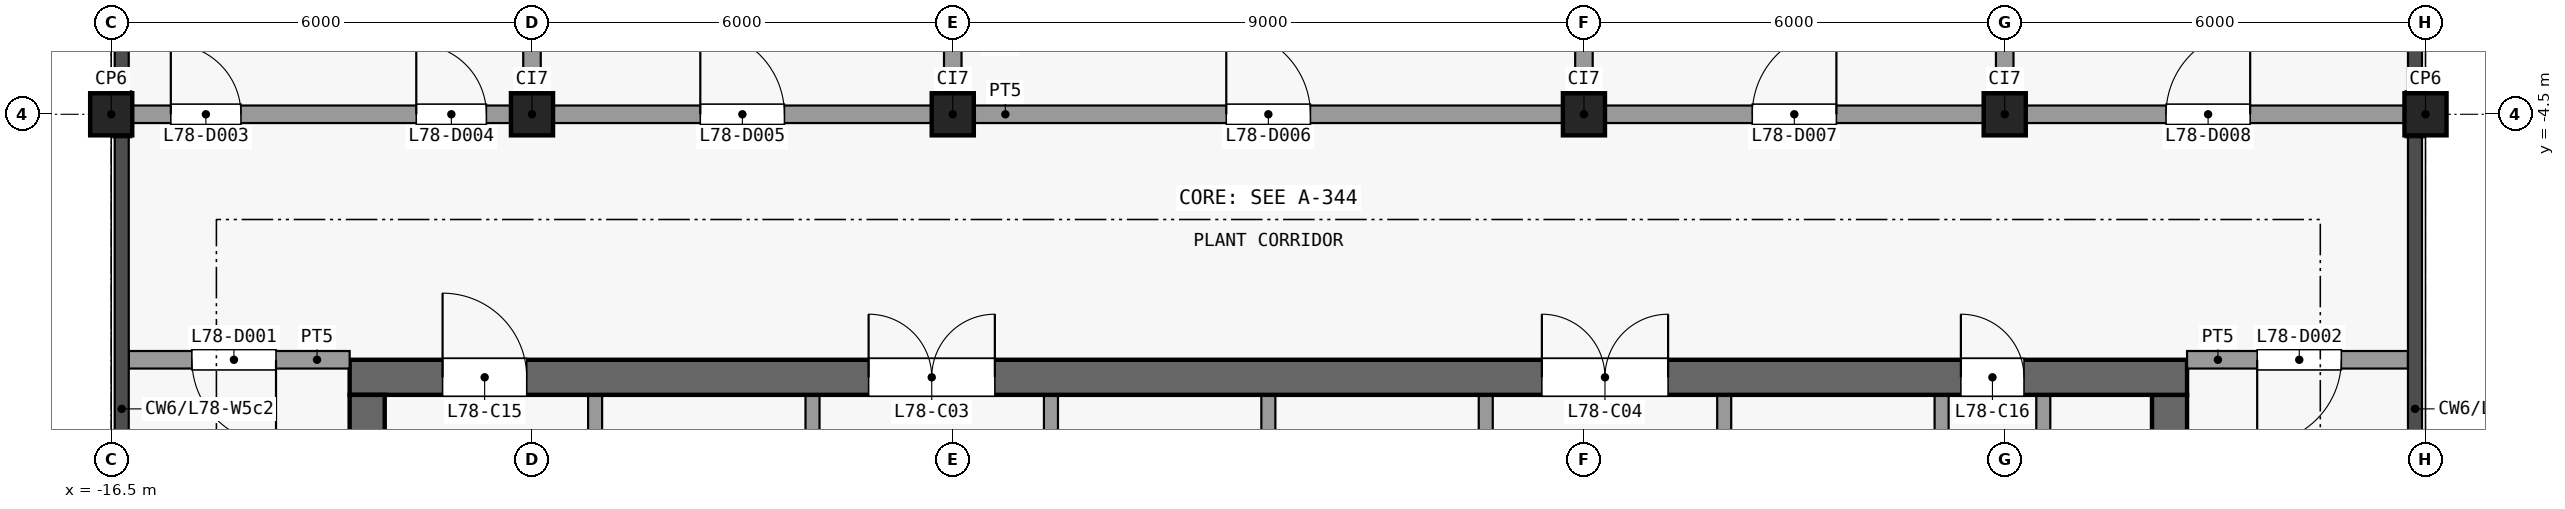
"""IFC4 building model, lengths in metres.
Left out: names, types, materials, properties, quantities, classifications, styles, units other than length and angle.
Written with IfcOpenShell. Run it as: python <this file> out.ifc"""

import sys

from ifc_helpers import new_model, si_unit, direction, frame, frame_2d, origin, origin_2d, place, context, subcontext, project, spatial, rectangle, extrude, element, fill, save


model = new_model("IFC4")
c1 = context("Model", 3, precision=1e-05, world=origin(), true_north=direction((0.0, 1.0)))
c2 = subcontext(c1, "Body", "Model", "MODEL_VIEW")
j1 = project(units=[si_unit("LENGTHUNIT", "METRE"), si_unit("PLANEANGLEUNIT", "RADIAN")], contexts=[c1])
p1 = place(None, origin())
s1 = spatial("IfcSite", under=j1, at=p1, CompositionType="ELEMENT")
p2 = place(p1, origin())
s2 = spatial("IfcBuilding", under=s1, at=p2, CompositionType="ELEMENT")
p3 = place(p2, frame((0.0, 0.0, 307.7)))
s3 = spatial("IfcBuildingStorey", under=s2, at=p3, CompositionType="ELEMENT", Elevation=307.7)
for number, where, z_axis, x_axis in (
    (1, (-16.5, -4.5, 0.0), (0.0, 0.0, 1.0), (1.0, 0.0, 0.0)),
    (2, (-10.5, -4.5, 0.0), (0.0, 0.0, 1.0), (1.0, 0.0, 0.0)),
    (3, (-4.5, -4.5, 0.0), (0.0, 0.0, 1.0), (1.0, 0.0, 0.0)),
    (4, (4.5, -4.5, 0.0), (0.0, 0.0, 1.0), (1.0, 0.0, 0.0)),
    (5, (10.5, -4.5, 0.0), (0.0, 0.0, 1.0), (1.0, 0.0, 0.0)),
    (6, (16.5, -4.5, 0.0), (0.0, 0.0, 1.0), (1.0, 0.0, 0.0)),
):
    element("IfcColumn", number, at=place(p3, frame(where, z_axis=z_axis, x_axis=x_axis)), inside=s3, PredefinedType="COLUMN", context=c2, shape_type="SweptSolid", body=[
        extrude(rectangle(XDim=0.6, YDim=0.6, at=origin_2d()), origin(), (0.0, 0.0, 1.0), 4.5),
    ])
p4 = place(p3, frame((-13.1, -8.25, 0.0), z_axis=(0.0, 0.0, 1.0), x_axis=(1.0, 0.0, 0.0)))
e7 = element("IfcWall", 7, at=p4, inside=s3, PredefinedType="SHEAR", context=c2, shape_type="SweptSolid", body=[
    extrude(rectangle(XDim=26.2, YDim=0.5, at=frame_2d((13.1, 0.0))), origin(), (0.0, 0.0, 1.0), 4.1),
])
p5 = place(p4, frame((7.4, 0.0, 0.0)))
e8 = element("IfcOpeningElement", 8, at=p5, cuts=e7, PredefinedType="OPENING", context=c2, shape_type="SweptSolid", body=[
    extrude(rectangle(XDim=1.8, YDim=2.1, at=frame_2d((0.9, 1.05))), frame((0.0, 0.26, 0.0), z_axis=(0.0, -1.0, 0.0), x_axis=(1.0, 0.0, 0.0)), (0.0, 0.0, 1.0), 0.52),
])
p6 = place(p4, frame((17.0, 0.0, 0.0)))
e9 = element("IfcOpeningElement", 9, at=p6, cuts=e7, PredefinedType="OPENING", context=c2, shape_type="SweptSolid", body=[
    extrude(rectangle(XDim=1.8, YDim=2.1, at=frame_2d((0.9, 1.05))), frame((0.0, 0.26, 0.0), z_axis=(0.0, -1.0, 0.0), x_axis=(1.0, 0.0, 0.0)), (0.0, 0.0, 1.0), 0.52),
])
p7 = place(p4, frame((1.325, 0.0, 0.0)))
e10 = element("IfcOpeningElement", 10, at=p7, cuts=e7, PredefinedType="OPENING", context=c2, shape_type="SweptSolid", body=[
    extrude(rectangle(XDim=1.2, YDim=2.1, at=frame_2d((0.6, 1.05))), frame((0.0, 0.26, 0.0), z_axis=(0.0, -1.0, 0.0), x_axis=(1.0, 0.0, 0.0)), (0.0, 0.0, 1.0), 0.52),
])
p8 = place(p4, frame((22.975, 0.0, 0.0)))
e11 = element("IfcOpeningElement", 11, at=p8, cuts=e7, PredefinedType="OPENING", context=c2, shape_type="SweptSolid", body=[
    extrude(rectangle(XDim=0.9, YDim=2.1, at=frame_2d((0.45, 1.05))), frame((0.0, 0.26, 0.0), z_axis=(0.0, -1.0, 0.0), x_axis=(1.0, 0.0, 0.0)), (0.0, 0.0, 1.0), 0.52),
])
for number, where, z_axis, x_axis in (
    (12, (-12.85, -24.6, 0.0), (0.0, 0.0, 1.0), (0.0, 1.0, 0.0)),
    (13, (12.85, -24.6, 0.0), (0.0, 0.0, 1.0), (0.0, 1.0, 0.0)),
):
    element("IfcWall", number, at=place(p3, frame(where, z_axis=z_axis, x_axis=x_axis)), inside=s3, PredefinedType="SHEAR", context=c2, shape_type="SweptSolid", body=[
        extrude(rectangle(XDim=16.1, YDim=0.5, at=frame_2d((8.05, 0.0))), origin(), (0.0, 0.0, 1.0), 4.1),
    ])
p9 = place(p3, frame((-9.6, -16.9, 0.0), z_axis=(0.0, 0.0, 1.0), x_axis=(0.0, 1.0, 0.0)))
e14 = element("IfcWall", 14, at=p9, inside=s3, PredefinedType="PARTITIONING", context=c2, shape_type="SweptSolid", body=[
    extrude(rectangle(XDim=8.4, YDim=0.2, at=frame_2d((4.2, 0.0))), origin(), (0.0, 0.0, 1.0), 4.1),
])
p10 = place(p3, frame((-6.5, -22.5, 0.0), z_axis=(0.0, 0.0, 1.0), x_axis=(0.0, 1.0, 0.0)))
e15 = element("IfcWall", 15, at=p10, inside=s3, PredefinedType="PARTITIONING", context=c2, shape_type="SweptSolid", body=[
    extrude(rectangle(XDim=14.0, YDim=0.2, at=frame_2d((7.0, 0.0))), origin(), (0.0, 0.0, 1.0), 4.1),
])
p11 = place(p10, frame((2.28, 0.0, 0.0)))
e16 = element("IfcOpeningElement", 16, at=p11, cuts=e15, PredefinedType="OPENING", context=c2, shape_type="SweptSolid", body=[
    extrude(rectangle(XDim=1.2, YDim=2.1, at=frame_2d((0.6, 1.05))), frame((0.0, 0.11, 0.0), z_axis=(0.0, -1.0, 0.0), x_axis=(1.0, 0.0, 0.0)), (0.0, 0.0, 1.0), 0.22),
])
p12 = place(p10, frame((9.23, 0.0, 0.0)))
e17 = element("IfcOpeningElement", 17, at=p12, cuts=e15, PredefinedType="OPENING", context=c2, shape_type="SweptSolid", body=[
    extrude(rectangle(XDim=1.2, YDim=2.1, at=frame_2d((0.6, 1.05))), frame((0.0, 0.11, 0.0), z_axis=(0.0, -1.0, 0.0), x_axis=(1.0, 0.0, 0.0)), (0.0, 0.0, 1.0), 0.22),
])
p13 = place(p3, frame((-3.1, -8.5, 0.0), z_axis=(0.0, 0.0, 1.0), x_axis=(0.0, -1.0, 0.0)))
e18 = element("IfcWall", 18, at=p13, inside=s3, PredefinedType="PARTITIONING", context=c2, shape_type="SweptSolid", body=[
    extrude(rectangle(XDim=10.97, YDim=0.2, at=frame_2d((5.485, 0.0))), origin(), (0.0, 0.0, 1.0), 4.1),
])
p14 = place(p13, frame((7.74, 0.0, 0.0)))
e19 = element("IfcOpeningElement", 19, at=p14, cuts=e18, PredefinedType="OPENING", context=c2, shape_type="SweptSolid", body=[
    extrude(rectangle(XDim=1.2, YDim=2.1, at=frame_2d((0.6, 1.05))), frame((0.0, 0.11, 0.0), z_axis=(0.0, -1.0, 0.0), x_axis=(1.0, 0.0, 0.0)), (0.0, 0.0, 1.0), 0.22),
])
p15 = place(p13, frame((2.18, 0.0, 0.0)))
e20 = element("IfcOpeningElement", 20, at=p15, cuts=e18, PredefinedType="OPENING", context=c2, shape_type="SweptSolid", body=[
    extrude(rectangle(XDim=1.2, YDim=2.1, at=frame_2d((0.6, 1.05))), frame((0.0, 0.11, 0.0), z_axis=(0.0, -1.0, 0.0), x_axis=(1.0, 0.0, 0.0)), (0.0, 0.0, 1.0), 0.22),
])
p16 = place(p3, frame((0.0, -19.35, 0.0), z_axis=(0.0, 0.0, 1.0), x_axis=(0.0, 1.0, 0.0)))
e21 = element("IfcWall", 21, at=p16, inside=s3, PredefinedType="PARTITIONING", context=c2, shape_type="SweptSolid", body=[
    extrude(rectangle(XDim=10.85, YDim=0.2, at=frame_2d((5.425, 0.0))), origin(), (0.0, 0.0, 1.0), 4.1),
])
p17 = place(p3, frame((3.1, -19.6, 0.0), z_axis=(0.0, 0.0, 1.0), x_axis=(0.0, 1.0, 0.0)))
e22 = element("IfcWall", 22, at=p17, inside=s3, PredefinedType="PARTITIONING", context=c2, shape_type="SweptSolid", body=[
    extrude(rectangle(XDim=11.1, YDim=0.2, at=frame_2d((5.55, 0.0))), origin(), (0.0, 0.0, 1.0), 4.1),
])
p18 = place(p17, frame((2.25, 0.0, 0.0)))
e23 = element("IfcOpeningElement", 23, at=p18, cuts=e22, PredefinedType="OPENING", context=c2, shape_type="SweptSolid", body=[
    extrude(rectangle(XDim=1.2, YDim=2.1, at=frame_2d((0.6, 1.05))), frame((0.0, 0.11, 0.0), z_axis=(0.0, -1.0, 0.0), x_axis=(1.0, 0.0, 0.0)), (0.0, 0.0, 1.0), 0.22),
])
p19 = place(p17, frame((7.75, 0.0, 0.0)))
e24 = element("IfcOpeningElement", 24, at=p19, cuts=e22, PredefinedType="OPENING", context=c2, shape_type="SweptSolid", body=[
    extrude(rectangle(XDim=1.2, YDim=2.1, at=frame_2d((0.6, 1.05))), frame((0.0, 0.11, 0.0), z_axis=(0.0, -1.0, 0.0), x_axis=(1.0, 0.0, 0.0)), (0.0, 0.0, 1.0), 0.22),
])
p20 = place(p3, frame((6.5, -8.5, 0.0), z_axis=(0.0, 0.0, 1.0), x_axis=(0.0, -1.0, 0.0)))
e25 = element("IfcWall", 25, at=p20, inside=s3, PredefinedType="PARTITIONING", context=c2, shape_type="SweptSolid", body=[
    extrude(rectangle(XDim=10.85, YDim=0.2, at=frame_2d((5.425, 0.0))), origin(), (0.0, 0.0, 1.0), 4.1),
])
p21 = place(p20, frame((6.275, 0.0, 0.0)))
e26 = element("IfcOpeningElement", 26, at=p21, cuts=e25, PredefinedType="OPENING", context=c2, shape_type="SweptSolid", body=[
    extrude(rectangle(XDim=1.2, YDim=2.1, at=frame_2d((0.6, 1.05))), frame((0.0, 0.11, 0.0), z_axis=(0.0, -1.0, 0.0), x_axis=(1.0, 0.0, 0.0)), (0.0, 0.0, 1.0), 0.22),
])
p22 = place(p20, frame((0.925, 0.0, 0.0)))
e27 = element("IfcOpeningElement", 27, at=p22, cuts=e25, PredefinedType="OPENING", context=c2, shape_type="SweptSolid", body=[
    extrude(rectangle(XDim=0.9, YDim=2.1, at=frame_2d((0.45, 1.05))), frame((0.0, 0.11, 0.0), z_axis=(0.0, -1.0, 0.0), x_axis=(1.0, 0.0, 0.0)), (0.0, 0.0, 1.0), 0.22),
])
p23 = place(p3, frame((9.6, -16.9, 0.0), z_axis=(0.0, 0.0, 1.0), x_axis=(0.0, 1.0, 0.0)))
e28 = element("IfcWall", 28, at=p23, inside=s3, PredefinedType="PARTITIONING", context=c2, shape_type="SweptSolid", body=[
    extrude(rectangle(XDim=8.4, YDim=0.2, at=frame_2d((4.2, 0.0))), origin(), (0.0, 0.0, 1.0), 4.1),
])
p24 = place(p3, frame((11.05, -8.5, 0.0), z_axis=(0.0, 0.0, 1.0), x_axis=(0.0, -1.0, 0.0)))
e29 = element("IfcWall", 29, at=p24, inside=s3, PredefinedType="PARTITIONING", context=c2, shape_type="SweptSolid", body=[
    extrude(rectangle(XDim=6.2, YDim=0.2, at=frame_2d((3.1, 0.0))), origin(), (0.0, 0.0, 1.0), 4.1),
])
p25 = place(p24, frame((2.6, 0.0, 0.0)))
e30 = element("IfcOpeningElement", 30, at=p25, cuts=e29, PredefinedType="OPENING", context=c2, shape_type="SweptSolid", body=[
    extrude(rectangle(XDim=0.9, YDim=2.1, at=frame_2d((0.45, 1.05))), frame((0.0, 0.11, 0.0), z_axis=(0.0, -1.0, 0.0), x_axis=(1.0, 0.0, 0.0)), (0.0, 0.0, 1.0), 0.22),
])
p26 = place(p3, frame((-16.25, -8.0, 0.0), z_axis=(0.0, 0.0, 1.0), x_axis=(1.0, 0.0, 0.0)))
e31 = element("IfcWall", 31, at=p26, inside=s3, PredefinedType="PARTITIONING", context=c2, shape_type="SweptSolid", body=[
    extrude(rectangle(XDim=3.15, YDim=0.25, at=frame_2d((1.575, 0.0))), origin(), (0.0, 0.0, 1.0), 4.1),
])
p27 = place(p26, frame((0.9, 0.0, 0.0)))
e32 = element("IfcOpeningElement", 32, at=p27, cuts=e31, PredefinedType="OPENING", context=c2, shape_type="SweptSolid", body=[
    extrude(rectangle(XDim=1.2, YDim=2.1, at=frame_2d((0.6, 1.05))), frame((0.0, 0.135, 0.0), z_axis=(0.0, -1.0, 0.0), x_axis=(1.0, 0.0, 0.0)), (0.0, 0.0, 1.0), 0.27),
])
p28 = place(p3, frame((13.1, -8.0, 0.0), z_axis=(0.0, 0.0, 1.0), x_axis=(1.0, 0.0, 0.0)))
e33 = element("IfcWall", 33, at=p28, inside=s3, PredefinedType="PARTITIONING", context=c2, shape_type="SweptSolid", body=[
    extrude(rectangle(XDim=3.15, YDim=0.25, at=frame_2d((1.575, 0.0))), origin(), (0.0, 0.0, 1.0), 4.1),
])
p29 = place(p28, frame((1.0, 0.0, 0.0)))
e34 = element("IfcOpeningElement", 34, at=p29, cuts=e33, PredefinedType="OPENING", context=c2, shape_type="SweptSolid", body=[
    extrude(rectangle(XDim=1.2, YDim=2.1, at=frame_2d((0.6, 1.05))), frame((0.0, 0.135, 0.0), z_axis=(0.0, -1.0, 0.0), x_axis=(1.0, 0.0, 0.0)), (0.0, 0.0, 1.0), 0.27),
])
p30 = place(p3, frame((-16.35, -4.5, 0.0), z_axis=(0.0, 0.0, 1.0), x_axis=(1.0, 0.0, 0.0)))
e35 = element("IfcWall", 35, at=p30, inside=s3, PredefinedType="PARTITIONING", context=c2, shape_type="SweptSolid", body=[
    extrude(rectangle(XDim=32.7, YDim=0.25, at=frame_2d((16.35, 0.0))), origin(), (0.0, 0.0, 1.0), 4.1),
])
p31 = place(p30, frame((0.7, 0.0, 0.0)))
e36 = element("IfcOpeningElement", 36, at=p31, cuts=e35, PredefinedType="OPENING", context=c2, shape_type="SweptSolid", body=[
    extrude(rectangle(XDim=1.0, YDim=2.1, at=frame_2d((0.5, 1.05))), frame((0.0, 0.135, 0.0), z_axis=(0.0, -1.0, 0.0), x_axis=(1.0, 0.0, 0.0)), (0.0, 0.0, 1.0), 0.27),
])
p32 = place(p30, frame((4.2, 0.0, 0.0)))
e37 = element("IfcOpeningElement", 37, at=p32, cuts=e35, PredefinedType="OPENING", context=c2, shape_type="SweptSolid", body=[
    extrude(rectangle(XDim=1.0, YDim=2.1, at=frame_2d((0.5, 1.05))), frame((0.0, 0.135, 0.0), z_axis=(0.0, -1.0, 0.0), x_axis=(1.0, 0.0, 0.0)), (0.0, 0.0, 1.0), 0.27),
])
p33 = place(p30, frame((8.25, 0.0, 0.0)))
e38 = element("IfcOpeningElement", 38, at=p33, cuts=e35, PredefinedType="OPENING", context=c2, shape_type="SweptSolid", body=[
    extrude(rectangle(XDim=1.2, YDim=2.1, at=frame_2d((0.6, 1.05))), frame((0.0, 0.135, 0.0), z_axis=(0.0, -1.0, 0.0), x_axis=(1.0, 0.0, 0.0)), (0.0, 0.0, 1.0), 0.27),
])
p34 = place(p30, frame((15.75, 0.0, 0.0)))
e39 = element("IfcOpeningElement", 39, at=p34, cuts=e35, PredefinedType="OPENING", context=c2, shape_type="SweptSolid", body=[
    extrude(rectangle(XDim=1.2, YDim=2.1, at=frame_2d((0.6, 1.05))), frame((0.0, 0.135, 0.0), z_axis=(0.0, -1.0, 0.0), x_axis=(1.0, 0.0, 0.0)), (0.0, 0.0, 1.0), 0.27),
])
p35 = place(p30, frame((23.25, 0.0, 0.0)))
e40 = element("IfcOpeningElement", 40, at=p35, cuts=e35, PredefinedType="OPENING", context=c2, shape_type="SweptSolid", body=[
    extrude(rectangle(XDim=1.2, YDim=2.1, at=frame_2d((0.6, 1.05))), frame((0.0, 0.135, 0.0), z_axis=(0.0, -1.0, 0.0), x_axis=(1.0, 0.0, 0.0)), (0.0, 0.0, 1.0), 0.27),
])
p36 = place(p30, frame((29.15, 0.0, 0.0)))
e41 = element("IfcOpeningElement", 41, at=p36, cuts=e35, PredefinedType="OPENING", context=c2, shape_type="SweptSolid", body=[
    extrude(rectangle(XDim=1.2, YDim=2.1, at=frame_2d((0.6, 1.05))), frame((0.0, 0.135, 0.0), z_axis=(0.0, -1.0, 0.0), x_axis=(1.0, 0.0, 0.0)), (0.0, 0.0, 1.0), 0.27),
])
for number, where, z_axis, x_axis in (
    (42, (-10.5, -4.375, 0.0), (0.0, 0.0, 1.0), (0.0, 1.0, 0.0)),
    (43, (-4.5, -4.375, 0.0), (0.0, 0.0, 1.0), (0.0, 1.0, 0.0)),
    (44, (4.5, -4.375, 0.0), (0.0, 0.0, 1.0), (0.0, 1.0, 0.0)),
    (45, (10.5, -4.375, 0.0), (0.0, 0.0, 1.0), (0.0, 1.0, 0.0)),
):
    element("IfcWall", number, at=place(p3, frame(where, z_axis=z_axis, x_axis=x_axis)), inside=s3, PredefinedType="PARTITIONING", context=c2, shape_type="SweptSolid", body=[
        extrude(rectangle(XDim=17.725, YDim=0.25, at=frame_2d((8.863, 0.0))), origin(), (0.0, 0.0, 1.0), 4.1),
    ])
p37 = place(p5, origin())
e46 = element("IfcDoor", 46, at=p37, inside=s3, OperationType="DOUBLE_DOOR_SINGLE_SWING", PredefinedType="DOOR", context=c2, shape_type="SweptSolid", body=[
    extrude(rectangle(XDim=1.8, YDim=2.1, at=frame_2d((0.9, 1.05))), frame((0.0, 0.025, 0.0), z_axis=(0.0, -1.0, 0.0), x_axis=(1.0, 0.0, 0.0)), (0.0, 0.0, 1.0), 0.05),
])
fill(e8, e46)
p38 = place(p6, origin())
e47 = element("IfcDoor", 47, at=p38, inside=s3, OperationType="DOUBLE_DOOR_SINGLE_SWING", PredefinedType="DOOR", context=c2, shape_type="SweptSolid", body=[
    extrude(rectangle(XDim=1.8, YDim=2.1, at=frame_2d((0.9, 1.05))), frame((0.0, 0.025, 0.0), z_axis=(0.0, -1.0, 0.0), x_axis=(1.0, 0.0, 0.0)), (0.0, 0.0, 1.0), 0.05),
])
fill(e9, e47)
p39 = place(p7, origin())
e48 = element("IfcDoor", 48, at=p39, inside=s3, OperationType="SINGLE_SWING_LEFT", PredefinedType="DOOR", context=c2, shape_type="SweptSolid", body=[
    extrude(rectangle(XDim=1.2, YDim=2.1, at=frame_2d((0.6, 1.05))), frame((0.0, 0.025, 0.0), z_axis=(0.0, -1.0, 0.0), x_axis=(1.0, 0.0, 0.0)), (0.0, 0.0, 1.0), 0.05),
])
fill(e10, e48)
p40 = place(p8, origin())
e49 = element("IfcDoor", 49, at=p40, inside=s3, OperationType="SINGLE_SWING_LEFT", PredefinedType="DOOR", context=c2, shape_type="SweptSolid", body=[
    extrude(rectangle(XDim=0.9, YDim=2.1, at=frame_2d((0.45, 1.05))), frame((0.0, 0.025, 0.0), z_axis=(0.0, -1.0, 0.0), x_axis=(1.0, 0.0, 0.0)), (0.0, 0.0, 1.0), 0.05),
])
fill(e11, e49)
p41 = place(p27, origin())
e50 = element("IfcDoor", 50, at=p41, inside=s3, OperationType="SINGLE_SWING_RIGHT", PredefinedType="DOOR", context=c2, shape_type="SweptSolid", body=[
    extrude(rectangle(XDim=1.2, YDim=2.1, at=frame_2d((0.6, 1.05))), frame((0.0, 0.025, 0.0), z_axis=(0.0, -1.0, 0.0), x_axis=(1.0, 0.0, 0.0)), (0.0, 0.0, 1.0), 0.05),
])
fill(e32, e50)
p42 = place(p29, origin())
e51 = element("IfcDoor", 51, at=p42, inside=s3, OperationType="SINGLE_SWING_LEFT", PredefinedType="DOOR", context=c2, shape_type="SweptSolid", body=[
    extrude(rectangle(XDim=1.2, YDim=2.1, at=frame_2d((0.6, 1.05))), frame((0.0, 0.025, 0.0), z_axis=(0.0, -1.0, 0.0), x_axis=(1.0, 0.0, 0.0)), (0.0, 0.0, 1.0), 0.05),
])
fill(e34, e51)
p43 = place(p31, origin())
e52 = element("IfcDoor", 52, at=p43, inside=s3, OperationType="SINGLE_SWING_RIGHT", PredefinedType="DOOR", context=c2, shape_type="SweptSolid", body=[
    extrude(rectangle(XDim=1.0, YDim=2.1, at=frame_2d((0.5, 1.05))), frame((0.0, 0.025, 0.0), z_axis=(0.0, -1.0, 0.0), x_axis=(1.0, 0.0, 0.0)), (0.0, 0.0, 1.0), 0.05),
])
fill(e36, e52)
p44 = place(p32, origin())
e53 = element("IfcDoor", 53, at=p44, inside=s3, OperationType="SINGLE_SWING_RIGHT", PredefinedType="DOOR", context=c2, shape_type="SweptSolid", body=[
    extrude(rectangle(XDim=1.0, YDim=2.1, at=frame_2d((0.5, 1.05))), frame((0.0, 0.025, 0.0), z_axis=(0.0, -1.0, 0.0), x_axis=(1.0, 0.0, 0.0)), (0.0, 0.0, 1.0), 0.05),
])
fill(e37, e53)
p45 = place(p33, origin())
e54 = element("IfcDoor", 54, at=p45, inside=s3, OperationType="SINGLE_SWING_RIGHT", PredefinedType="DOOR", context=c2, shape_type="SweptSolid", body=[
    extrude(rectangle(XDim=1.2, YDim=2.1, at=frame_2d((0.6, 1.05))), frame((0.0, 0.025, 0.0), z_axis=(0.0, -1.0, 0.0), x_axis=(1.0, 0.0, 0.0)), (0.0, 0.0, 1.0), 0.05),
])
fill(e38, e54)
p46 = place(p34, origin())
e55 = element("IfcDoor", 55, at=p46, inside=s3, OperationType="SINGLE_SWING_RIGHT", PredefinedType="DOOR", context=c2, shape_type="SweptSolid", body=[
    extrude(rectangle(XDim=1.2, YDim=2.1, at=frame_2d((0.6, 1.05))), frame((0.0, 0.025, 0.0), z_axis=(0.0, -1.0, 0.0), x_axis=(1.0, 0.0, 0.0)), (0.0, 0.0, 1.0), 0.05),
])
fill(e39, e55)
p47 = place(p35, origin())
e56 = element("IfcDoor", 56, at=p47, inside=s3, OperationType="SINGLE_SWING_LEFT", PredefinedType="DOOR", context=c2, shape_type="SweptSolid", body=[
    extrude(rectangle(XDim=1.2, YDim=2.1, at=frame_2d((0.6, 1.05))), frame((0.0, 0.025, 0.0), z_axis=(0.0, -1.0, 0.0), x_axis=(1.0, 0.0, 0.0)), (0.0, 0.0, 1.0), 0.05),
])
fill(e40, e56)
p48 = place(p36, origin())
e57 = element("IfcDoor", 57, at=p48, inside=s3, OperationType="SINGLE_SWING_LEFT", PredefinedType="DOOR", context=c2, shape_type="SweptSolid", body=[
    extrude(rectangle(XDim=1.2, YDim=2.1, at=frame_2d((0.6, 1.05))), frame((0.0, 0.025, 0.0), z_axis=(0.0, -1.0, 0.0), x_axis=(1.0, 0.0, 0.0)), (0.0, 0.0, 1.0), 0.05),
])
fill(e41, e57)
save(model, sys.argv[1])
